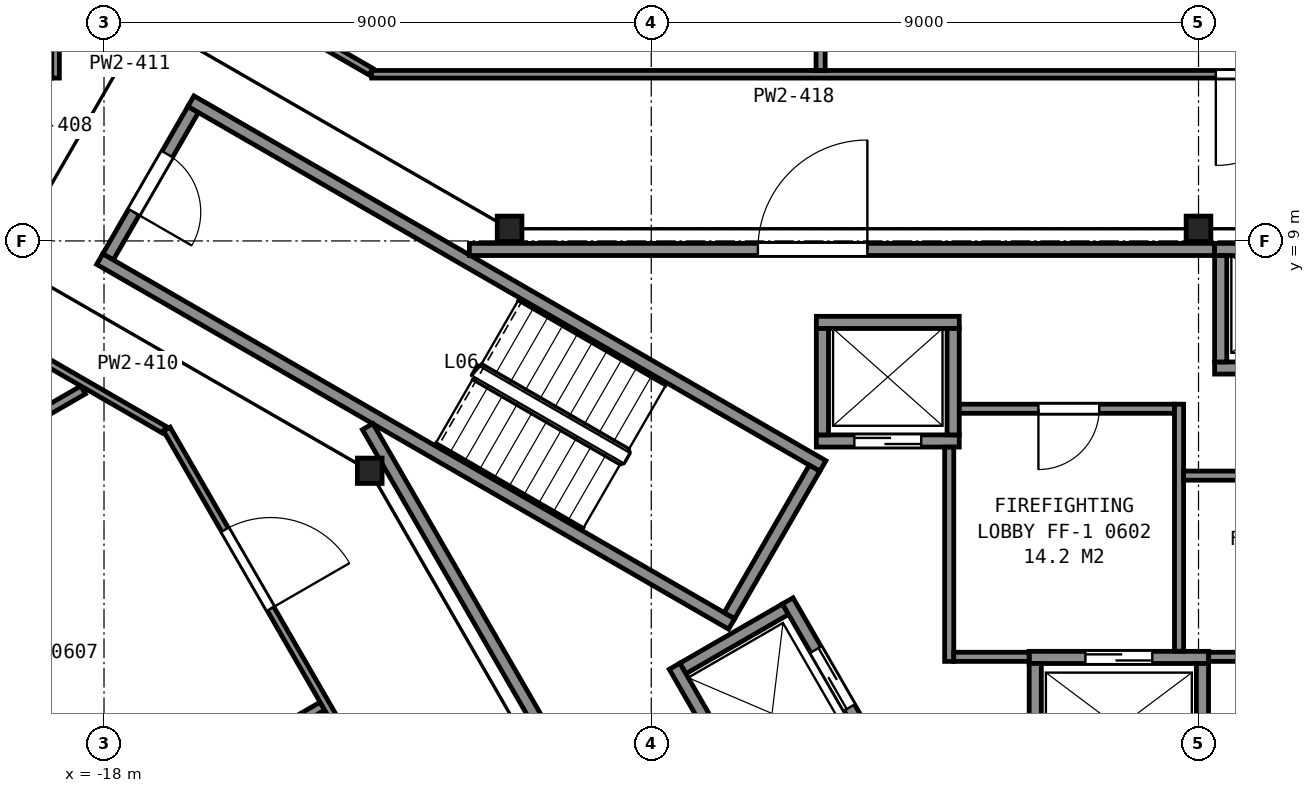
"""IFC4 building model, lengths in metres.
Left out: names, types, materials, properties, quantities, classifications, styles, units other than length and angle.
Written with IfcOpenShell. Run it as: python <this file> out.ifc"""

import sys

from ifc_helpers import new_model, si_unit, direction, frame, frame_2d, origin, origin_2d, place, context, subcontext, project, spatial, rectangle, i_section, extrude, element, fill, save


model = new_model("IFC4")
c1 = context("Model", 3, precision=1e-05, world=origin(), true_north=direction((0.0, 1.0)))
c2 = subcontext(c1, "Body", "Model", "MODEL_VIEW")
j1 = project(units=[si_unit("LENGTHUNIT", "METRE"), si_unit("PLANEANGLEUNIT", "RADIAN")], contexts=[c1])
p1 = place(None, origin())
s1 = spatial("IfcSite", under=j1, at=p1, CompositionType="ELEMENT")
p2 = place(p1, origin())
s2 = spatial("IfcBuilding", under=s1, at=p2, CompositionType="ELEMENT")
p3 = place(p2, frame((0.0, 0.0, 36.8)))
s3 = spatial("IfcBuildingStorey", under=s2, at=p3, CompositionType="ELEMENT", Elevation=36.8)
for number, where, z_axis, x_axis in (
    (1, (0.0, 9.2, 0.0), (0.0, 0.0, 1.0), (1.0, 0.0, 0.0)),
    (2, (-11.33, 9.2, 0.0), (0.0, 0.0, 1.0), (1.0, 0.0, 0.0)),
    (3, (-13.63, 5.22, 0.0), (0.0, 0.0, 1.0), (1.0, 0.0, 0.0)),
):
    element("IfcColumn", number, at=place(p3, frame(where, z_axis=z_axis, x_axis=x_axis)), inside=s3, PredefinedType="COLUMN", context=c2, shape_type="SweptSolid", body=[
        extrude(i_section(OverallWidth=0.406, OverallDepth=0.417, WebThickness=0.03, FlangeThickness=0.048, FilletRadius=0.015, at=origin_2d()), origin(), (0.0, 0.0, 1.0), 3.6),
    ])
p4 = place(p3, frame((-16.534, 11.162, 0.0), z_axis=(0.0, 0.0, 1.0), x_axis=(-0.49998411664, -0.866034573852, 0.0)))
e4 = element("IfcWall", 4, at=p4, inside=s3, PredefinedType="PARTITIONING", context=c2, shape_type="SweptSolid", body=[
    extrude(rectangle(XDim=2.8, YDim=0.2, at=frame_2d((1.4, 0.0))), origin(), (0.0, 0.0, 1.0), 3.35),
])
p5 = place(p4, frame((0.85, 0.0, 0.0)))
e5 = element("IfcOpeningElement", 5, at=p5, cuts=e4, PredefinedType="OPENING", context=c2, shape_type="SweptSolid", body=[
    extrude(rectangle(XDim=1.1, YDim=2.1, at=frame_2d((0.55, 1.05))), frame((0.0, 0.11, 0.0), z_axis=(0.0, -1.0, 0.0), x_axis=(1.0, 0.0, 0.0)), (0.0, 0.0, 1.0), 0.22),
])
for number, where, z_axis, x_axis in (
    (6, (-7.678, 2.701, 0.0), (0.0, 0.0, 1.0), (-0.866, 0.5, 0.0)),
    (7, (-6.178, 5.299, 0.0), (0.0, 0.0, 1.0), (-0.866, 0.5, 0.0)),
):
    element("IfcWall", number, at=place(p3, frame(where, z_axis=z_axis, x_axis=x_axis)), inside=s3, PredefinedType="PARTITIONING", context=c2, shape_type="SweptSolid", body=[
        extrude(rectangle(XDim=12.0, YDim=0.2, at=frame_2d((6.0, 0.0))), origin(), (0.0, 0.0, 1.0), 3.35),
    ])
p6 = place(p3, frame((-6.315, 5.262, 0.0), z_axis=(0.0, 0.0, 1.0), x_axis=(-0.500049511043, -0.865996816683, 0.0)))
e8 = element("IfcWall", 8, at=p6, inside=s3, PredefinedType="PARTITIONING", context=c2, shape_type="SweptSolid", body=[
    extrude(rectangle(XDim=2.8, YDim=0.2, at=frame_2d((1.4, 0.0))), origin(), (0.0, 0.0, 1.0), 3.35),
])
p7 = place(p3, frame((-2.785, 2.15, 0.0), z_axis=(0.0, 0.0, 1.0), x_axis=(1.0, 0.0, 0.0)))
e9 = element("IfcWall", 9, at=p7, inside=s3, PredefinedType="PARTITIONING", context=c2, shape_type="SweptSolid", body=[
    extrude(rectangle(XDim=2.95, YDim=0.2, at=frame_2d((1.475, 0.0))), origin(), (0.0, 0.0, 1.0), 3.6),
])
p8 = place(p7, frame((0.925, 0.0, 0.0)))
e10 = element("IfcOpeningElement", 10, at=p8, cuts=e9, PredefinedType="OPENING", context=c2, shape_type="SweptSolid", body=[
    extrude(rectangle(XDim=1.1, YDim=2.1, at=frame_2d((0.55, 1.05))), frame((0.0, 0.11, 0.0), z_axis=(0.0, -1.0, 0.0), x_axis=(1.0, 0.0, 0.0)), (0.0, 0.0, 1.0), 0.22),
])
p9 = place(p3, frame((-6.285, 5.71, 0.0), z_axis=(0.0, 0.0, 1.0), x_axis=(1.0, 0.0, 0.0)))
e11 = element("IfcWall", 11, at=p9, inside=s3, PredefinedType="PARTITIONING", context=c2, shape_type="SweptSolid", body=[
    extrude(rectangle(XDim=2.35, YDim=0.2, at=frame_2d((1.175, 0.0))), origin(), (0.0, 0.0, 1.0), 3.6),
])
p10 = place(p9, frame((0.625, 0.0, 0.0)))
e12 = element("IfcOpeningElement", 12, at=p10, cuts=e11, PredefinedType="OPENING", context=c2, shape_type="SweptSolid", body=[
    extrude(rectangle(XDim=1.1, YDim=2.1, at=frame_2d((0.55, 1.05))), frame((0.0, 0.11, 0.0), z_axis=(0.0, -1.0, 0.0), x_axis=(1.0, 0.0, 0.0)), (0.0, 0.0, 1.0), 0.22),
])
p11 = place(p3, frame((0.265, 6.91, 0.0), z_axis=(0.0, 0.0, 1.0), x_axis=(1.0, 0.0, 0.0)))
e13 = element("IfcWall", 13, at=p11, inside=s3, PredefinedType="PARTITIONING", context=c2, shape_type="SweptSolid", body=[
    extrude(rectangle(XDim=2.55, YDim=0.2, at=frame_2d((1.275, 0.0))), origin(), (0.0, 0.0, 1.0), 3.6),
])
p12 = place(p11, frame((0.725, 0.0, 0.0)))
e14 = element("IfcOpeningElement", 14, at=p12, cuts=e13, PredefinedType="OPENING", context=c2, shape_type="SweptSolid", body=[
    extrude(rectangle(XDim=1.1, YDim=2.1, at=frame_2d((0.55, 1.05))), frame((0.0, 0.11, 0.0), z_axis=(0.0, -1.0, 0.0), x_axis=(1.0, 0.0, 0.0)), (0.0, 0.0, 1.0), 0.22),
])
p13 = place(p3, frame((-6.285, 7.66, 0.0), z_axis=(0.0, 0.0, 1.0), x_axis=(1.0, 0.0, 0.0)))
e15 = element("IfcWall", 15, at=p13, inside=s3, PredefinedType="PARTITIONING", context=c2, shape_type="SweptSolid", body=[
    extrude(rectangle(XDim=2.35, YDim=0.2, at=frame_2d((1.175, 0.0))), origin(), (0.0, 0.0, 1.0), 3.6),
])
p14 = place(p3, frame((0.265, 8.86, 0.0), z_axis=(0.0, 0.0, 1.0), x_axis=(1.0, 0.0, 0.0)))
e16 = element("IfcWall", 16, at=p14, inside=s3, PredefinedType="PARTITIONING", context=c2, shape_type="SweptSolid", body=[
    extrude(rectangle(XDim=2.55, YDim=0.2, at=frame_2d((1.275, 0.0))), origin(), (0.0, 0.0, 1.0), 3.6),
])
p15 = place(p3, frame((-8.48, 1.969, 0.0), z_axis=(0.0, 0.0, 1.0), x_axis=(0.866000020948, 0.500043961785, 0.0)))
e17 = element("IfcWall", 17, at=p15, inside=s3, PredefinedType="PARTITIONING", context=c2, shape_type="SweptSolid", body=[
    extrude(rectangle(XDim=1.95, YDim=0.2, at=frame_2d((0.975, 0.0))), origin(), (0.0, 0.0, 1.0), 3.6),
])
p16 = place(p3, frame((0.365, 7.01, 0.0), z_axis=(0.0, 0.0, 1.0), x_axis=(0.0, 1.0, 0.0)))
e18 = element("IfcWall", 18, at=p16, inside=s3, PredefinedType="PARTITIONING", context=c2, shape_type="SweptSolid", body=[
    extrude(rectangle(XDim=1.75, YDim=0.2, at=frame_2d((0.875, 0.0))), origin(), (0.0, 0.0, 1.0), 3.6),
])
for number, where, z_axis, x_axis in (
    (19, (0.065, 0.1, 0.0), (0.0, 0.0, 1.0), (0.0, 1.0, 0.0)),
    (20, (-2.685, 0.1, 0.0), (0.0, 0.0, 1.0), (0.0, 1.0, 0.0)),
):
    element("IfcWall", number, at=place(p3, frame(where, z_axis=z_axis, x_axis=x_axis)), inside=s3, PredefinedType="PARTITIONING", context=c2, shape_type="SweptSolid", body=[
        extrude(rectangle(XDim=1.95, YDim=0.2, at=frame_2d((0.975, 0.0))), origin(), (0.0, 0.0, 1.0), 3.6),
    ])
for number, where, z_axis, x_axis in (
    (21, (-4.035, 5.81, 0.0), (0.0, 0.0, 1.0), (0.0, 1.0, 0.0)),
    (22, (-6.185, 5.81, 0.0), (0.0, 0.0, 1.0), (0.0, 1.0, 0.0)),
):
    element("IfcWall", number, at=place(p3, frame(where, z_axis=z_axis, x_axis=x_axis)), inside=s3, PredefinedType="PARTITIONING", context=c2, shape_type="SweptSolid", body=[
        extrude(rectangle(XDim=1.75, YDim=0.2, at=frame_2d((0.875, 0.0))), origin(), (0.0, 0.0, 1.0), 3.6),
    ])
p17 = place(p3, frame((-5.28, 0.525, 0.0), z_axis=(0.0, 0.0, 1.0), x_axis=(-0.500037662692, 0.866003658127, 0.0)))
e23 = element("IfcWall", 23, at=p17, inside=s3, PredefinedType="PARTITIONING", context=c2, shape_type="SweptSolid", body=[
    extrude(rectangle(XDim=2.95, YDim=0.2, at=frame_2d((1.475, 0.0))), origin(), (0.0, 0.0, 1.0), 3.6),
])
p18 = place(p17, frame((0.925, 0.0, 0.0)))
e24 = element("IfcOpeningElement", 24, at=p18, cuts=e23, PredefinedType="OPENING", context=c2, shape_type="SweptSolid", body=[
    extrude(rectangle(XDim=1.1, YDim=2.1, at=frame_2d((0.55, 1.05))), frame((0.0, 0.11, 0.0), z_axis=(0.0, -1.0, 0.0), x_axis=(1.0, 0.0, 0.0)), (0.0, 0.0, 1.0), 0.22),
])
p19 = place(p3, frame((-7.242, -0.376, 0.0), z_axis=(0.0, 0.0, 1.0), x_axis=(-0.499996545922, 0.866027397988, 0.0)))
e25 = element("IfcWall", 25, at=p19, inside=s3, PredefinedType="PARTITIONING", context=c2, shape_type="SweptSolid", body=[
    extrude(rectangle(XDim=2.75, YDim=0.2, at=frame_2d((1.375, 0.0))), origin(), (0.0, 0.0, 1.0), 3.6),
])
p20 = place(p3, frame((-13.664, 5.946, 0.0), z_axis=(0.0, 0.0, 1.0), x_axis=(0.499994327219, -0.866028678941, 0.0)))
e26 = element("IfcWall", 26, at=p20, inside=s3, PredefinedType="PARTITIONING", context=c2, shape_type="SweptSolid", body=[
    extrude(rectangle(XDim=23.968, YDim=0.2, at=frame_2d((11.984, 0.0))), origin(), (0.0, 0.0, 1.0), 3.35),
])
p21 = place(p3, frame((0.263, 8.86, 0.0), z_axis=(0.0, 0.0, 1.0), x_axis=(-1.0, 0.0, 0.0)))
e27 = element("IfcWall", 27, at=p21, inside=s3, PredefinedType="PARTITIONING", context=c2, shape_type="SweptSolid", body=[
    extrude(rectangle(XDim=12.254, YDim=0.2, at=frame_2d((6.127, 0.0))), origin(), (0.0, 0.0, 1.0), 3.35),
])
p22 = place(p21, frame((5.709, 0.0, 0.0)))
e28 = element("IfcOpeningElement", 28, at=p22, cuts=e27, PredefinedType="OPENING", context=c2, shape_type="SweptSolid", body=[
    extrude(rectangle(XDim=1.8, YDim=2.1, at=frame_2d((0.9, 1.05))), frame((0.0, 0.11, 0.0), z_axis=(0.0, -1.0, 0.0), x_axis=(1.0, 0.0, 0.0)), (0.0, 0.0, 1.0), 0.22),
])
p23 = place(p3, frame((-4.1, 2.085, 0.0), z_axis=(0.0, 0.0, 1.0), x_axis=(0.0, 1.0, 0.0)))
e29 = element("IfcWall", 29, at=p23, inside=s3, PredefinedType="PARTITIONING", context=c2, shape_type="SweptSolid", body=[
    extrude(rectangle(XDim=3.523, YDim=0.15, at=frame_2d((1.761, 0.0))), origin(), (0.0, 0.0, 1.0), 3.35),
])
p24 = place(p3, frame((-4.025, 2.16, 0.0), z_axis=(0.0, 0.0, 1.0), x_axis=(1.0, 0.0, 0.0)))
e30 = element("IfcWall", 30, at=p24, inside=s3, PredefinedType="PARTITIONING", context=c2, shape_type="SweptSolid", body=[
    extrude(rectangle(XDim=1.238, YDim=0.15, at=frame_2d((0.619, 0.0))), origin(), (0.0, 0.0, 1.0), 3.35),
])
p25 = place(p3, frame((-3.933, 6.24, 0.0), z_axis=(0.0, 0.0, 1.0), x_axis=(1.0, 0.0, 0.0)))
e31 = element("IfcWall", 31, at=p25, inside=s3, PredefinedType="PARTITIONING", context=c2, shape_type="SweptSolid", body=[
    extrude(rectangle(XDim=3.538, YDim=0.15, at=frame_2d((1.769, 0.0))), origin(), (0.0, 0.0, 1.0), 3.35),
])
p26 = place(p25, frame((1.3, 0.0, 0.0)))
e32 = element("IfcOpeningElement", 32, at=p26, cuts=e31, PredefinedType="OPENING", context=c2, shape_type="SweptSolid", body=[
    extrude(rectangle(XDim=1.0, YDim=2.1, at=frame_2d((0.5, 1.05))), frame((0.0, 0.085, 0.0), z_axis=(0.0, -1.0, 0.0), x_axis=(1.0, 0.0, 0.0)), (0.0, 0.0, 1.0), 0.17),
])
p27 = place(p3, frame((-0.32, 2.252, 0.0), z_axis=(0.0, 0.0, 1.0), x_axis=(0.0, 1.0, 0.0)))
e33 = element("IfcWall", 33, at=p27, inside=s3, PredefinedType="PARTITIONING", context=c2, shape_type="SweptSolid", body=[
    extrude(rectangle(XDim=4.063, YDim=0.15, at=frame_2d((2.031, 0.0))), origin(), (0.0, 0.0, 1.0), 3.35),
])
p28 = place(p3, frame((-0.245, 5.14, 0.0), z_axis=(0.0, 0.0, 1.0), x_axis=(1.0, 0.0, 0.0)))
e34 = element("IfcWall", 34, at=p28, inside=s3, PredefinedType="PARTITIONING", context=c2, shape_type="SweptSolid", body=[
    extrude(rectangle(XDim=5.11, YDim=0.15, at=frame_2d((2.555, 0.0))), origin(), (0.0, 0.0, 1.0), 3.35),
])
p29 = place(p28, frame((1.975, 0.0, 0.0)))
e35 = element("IfcOpeningElement", 35, at=p29, cuts=e34, PredefinedType="OPENING", context=c2, shape_type="SweptSolid", body=[
    extrude(rectangle(XDim=1.0, YDim=2.1, at=frame_2d((0.5, 1.05))), frame((0.0, 0.085, 0.0), z_axis=(0.0, -1.0, 0.0), x_axis=(1.0, 0.0, 0.0)), (0.0, 0.0, 1.0), 0.17),
])
p30 = place(p3, frame((0.167, 2.16, 0.0), z_axis=(0.0, 0.0, 1.0), x_axis=(1.0, 0.0, 0.0)))
e36 = element("IfcWall", 36, at=p30, inside=s3, PredefinedType="PARTITIONING", context=c2, shape_type="SweptSolid", body=[
    extrude(rectangle(XDim=1.356, YDim=0.15, at=frame_2d((0.678, 0.0))), origin(), (0.0, 0.0, 1.0), 3.35),
])
p31 = place(p3, frame((-25.084, 2.657, 0.0), z_axis=(0.0, 0.0, 1.0), x_axis=(0.866001204974, 0.500041911227, 0.0)))
e37 = element("IfcWall", 37, at=p31, inside=s3, PredefinedType="PARTITIONING", context=c2, shape_type="SweptSolid", body=[
    extrude(rectangle(XDim=7.784, YDim=0.15, at=frame_2d((3.892, 0.0))), origin(), (0.0, 0.0, 1.0), 2.613),
])
p32 = place(p3, frame((-21.848, -2.948, 0.0), z_axis=(0.0, 0.0, 1.0), x_axis=(0.865958884393, 0.500115197271, 0.0)))
e38 = element("IfcWall", 38, at=p32, inside=s3, PredefinedType="PARTITIONING", context=c2, shape_type="SweptSolid", body=[
    extrude(rectangle(XDim=8.591, YDim=0.15, at=frame_2d((4.296, 0.0))), origin(), (0.0, 0.0, 1.0), 2.613),
])
p33 = place(p3, frame((-19.26, 7.194, 0.0), z_axis=(0.0, 0.0, 1.0), x_axis=(0.865944638795, -0.50013986298, 0.0)))
e39 = element("IfcWall", 39, at=p33, inside=s3, PredefinedType="PARTITIONING", context=c2, shape_type="SweptSolid", body=[
    extrude(rectangle(XDim=2.599, YDim=0.125, at=frame_2d((1.299, 0.0))), origin(), (0.0, 0.0, 1.0), 2.613),
])
p34 = place(p3, frame((-18.797, 11.678, 0.0), z_axis=(0.0, 0.0, 1.0), x_axis=(0.0, 1.0, 0.0)))
e40 = element("IfcWall", 40, at=p34, inside=s3, PredefinedType="PARTITIONING", context=c2, shape_type="SweptSolid", body=[
    extrude(rectangle(XDim=2.394, YDim=0.125, at=frame_2d((1.197, 0.0))), origin(), (0.0, 0.0, 1.0), 2.613),
])
p35 = place(p3, frame((-3.766, -16.958, 0.0), z_axis=(0.0, 0.0, 1.0), x_axis=(-0.500024758804, 0.866011108811, 0.0)))
e41 = element("IfcWall", 41, at=p35, inside=s3, PredefinedType="PARTITIONING", context=c2, shape_type="SweptSolid", body=[
    extrude(rectangle(XDim=26.402, YDim=0.125, at=frame_2d((13.201, 0.0))), origin(), (0.0, 0.0, 1.0), 2.613),
])
p36 = place(p35, frame((22.989, 0.0, 0.0)))
e42 = element("IfcOpeningElement", 42, at=p36, cuts=e41, PredefinedType="OPENING", context=c2, shape_type="SweptSolid", body=[
    extrude(rectangle(XDim=1.5, YDim=2.1, at=frame_2d((0.75, 1.05))), frame((0.0, 0.073, 0.0), z_axis=(0.0, -1.0, 0.0), x_axis=(1.0, 0.0, 0.0)), (0.0, 0.0, 1.0), 0.145),
])
p37 = place(p35, frame((17.175, 0.0, 0.0)))
e43 = element("IfcOpeningElement", 43, at=p37, cuts=e41, PredefinedType="OPENING", context=c2, shape_type="SweptSolid", body=[
    extrude(rectangle(XDim=1.5, YDim=2.1, at=frame_2d((0.75, 1.05))), frame((0.0, 0.073, 0.0), z_axis=(0.0, -1.0, 0.0), x_axis=(1.0, 0.0, 0.0)), (0.0, 0.0, 1.0), 0.145),
])
p38 = place(p35, frame((10.703, 0.0, 0.0)))
e44 = element("IfcOpeningElement", 44, at=p38, cuts=e41, PredefinedType="OPENING", context=c2, shape_type="SweptSolid", body=[
    extrude(rectangle(XDim=1.5, YDim=2.1, at=frame_2d((0.75, 1.05))), frame((0.0, 0.073, 0.0), z_axis=(0.0, -1.0, 0.0), x_axis=(1.0, 0.0, 0.0)), (0.0, 0.0, 1.0), 0.145),
])
p39 = place(p35, frame((4.231, 0.0, 0.0)))
e45 = element("IfcOpeningElement", 45, at=p39, cuts=e41, PredefinedType="OPENING", context=c2, shape_type="SweptSolid", body=[
    extrude(rectangle(XDim=1.5, YDim=2.1, at=frame_2d((0.75, 1.05))), frame((0.0, 0.073, 0.0), z_axis=(0.0, -1.0, 0.0), x_axis=(1.0, 0.0, 0.0)), (0.0, 0.0, 1.0), 0.145),
])
p40 = place(p3, frame((-15.857, 13.081, 0.0), z_axis=(0.0, 0.0, 1.0), x_axis=(0.865988195383, -0.500064441305, 0.0)))
e46 = element("IfcWall", 46, at=p40, inside=s3, PredefinedType="PARTITIONING", context=c2, shape_type="SweptSolid", body=[
    extrude(rectangle(XDim=2.595, YDim=0.125, at=frame_2d((1.298, 0.0))), origin(), (0.0, 0.0, 1.0), 2.613),
])
p41 = place(p3, frame((-13.598, 11.741, 0.0), z_axis=(0.0, 0.0, 1.0), x_axis=(1.0, 0.0, 0.0)))
e47 = element("IfcWall", 47, at=p41, inside=s3, PredefinedType="PARTITIONING", context=c2, shape_type="SweptSolid", body=[
    extrude(rectangle(XDim=27.197, YDim=0.125, at=frame_2d((13.598, 0.0))), origin(), (0.0, 0.0, 1.0), 2.613),
])
p42 = place(p41, frame((13.884, 0.0, 0.0)))
e48 = element("IfcOpeningElement", 48, at=p42, cuts=e47, PredefinedType="OPENING", context=c2, shape_type="SweptSolid", body=[
    extrude(rectangle(XDim=1.5, YDim=2.1, at=frame_2d((0.75, 1.05))), frame((0.0, 0.073, 0.0), z_axis=(0.0, -1.0, 0.0), x_axis=(1.0, 0.0, 0.0)), (0.0, 0.0, 1.0), 0.145),
])
p43 = place(p3, frame((-6.215, 11.803, 0.0), z_axis=(0.0, 0.0, 1.0), x_axis=(0.0, 1.0, 0.0)))
e49 = element("IfcWall", 49, at=p43, inside=s3, PredefinedType="PARTITIONING", context=c2, shape_type="SweptSolid", body=[
    extrude(rectangle(XDim=8.592, YDim=0.15, at=frame_2d((4.296, 0.0))), origin(), (0.0, 0.0, 1.0), 2.613),
])
p44 = place(p5, origin())
e50 = element("IfcDoor", 50, at=p44, inside=s3, OperationType="SINGLE_SWING_RIGHT", PredefinedType="DOOR", context=c2, shape_type="SweptSolid", body=[
    extrude(rectangle(XDim=1.1, YDim=2.1, at=frame_2d((0.55, 1.05))), frame((0.0, 0.025, 0.0), z_axis=(0.0, -1.0, 0.0), x_axis=(1.0, 0.0, 0.0)), (0.0, 0.0, 1.0), 0.05),
])
fill(e5, e50)
p45 = place(p10, origin())
e51 = element("IfcDoor", 51, at=p45, inside=s3, OperationType="SLIDING_TO_RIGHT", PredefinedType="DOOR", context=c2, shape_type="SweptSolid", body=[
    extrude(rectangle(XDim=1.1, YDim=2.1, at=frame_2d((0.55, 1.05))), frame((0.0, 0.025, 0.0), z_axis=(0.0, -1.0, 0.0), x_axis=(1.0, 0.0, 0.0)), (0.0, 0.0, 1.0), 0.05),
])
fill(e12, e51)
p46 = place(p8, origin())
e52 = element("IfcDoor", 52, at=p46, inside=s3, OperationType="SLIDING_TO_LEFT", PredefinedType="DOOR", context=c2, shape_type="SweptSolid", body=[
    extrude(rectangle(XDim=1.1, YDim=2.1, at=frame_2d((0.55, 1.05))), frame((0.0, 0.025, 0.0), z_axis=(0.0, -1.0, 0.0), x_axis=(1.0, 0.0, 0.0)), (0.0, 0.0, 1.0), 0.05),
])
fill(e10, e52)
p47 = place(p18, origin())
e53 = element("IfcDoor", 53, at=p47, inside=s3, OperationType="SLIDING_TO_LEFT", PredefinedType="DOOR", context=c2, shape_type="SweptSolid", body=[
    extrude(rectangle(XDim=1.1, YDim=2.1, at=frame_2d((0.55, 1.05))), frame((0.0, 0.025, 0.0), z_axis=(0.0, -1.0, 0.0), x_axis=(1.0, 0.0, 0.0)), (0.0, 0.0, 1.0), 0.05),
])
fill(e24, e53)
p48 = place(p22, origin())
e54 = element("IfcDoor", 54, at=p48, inside=s3, OperationType="DOUBLE_DOOR_SINGLE_SWING", PredefinedType="DOOR", context=c2, shape_type="SweptSolid", body=[
    extrude(rectangle(XDim=1.8, YDim=2.1, at=frame_2d((0.9, 1.05))), frame((0.0, 0.025, 0.0), z_axis=(0.0, -1.0, 0.0), x_axis=(1.0, 0.0, 0.0)), (0.0, 0.0, 1.0), 0.05),
])
fill(e28, e54)
p49 = place(p26, origin())
e55 = element("IfcDoor", 55, at=p49, inside=s3, OperationType="SINGLE_SWING_LEFT", PredefinedType="DOOR", context=c2, shape_type="SweptSolid", body=[
    extrude(rectangle(XDim=1.0, YDim=2.1, at=frame_2d((0.5, 1.05))), frame((0.0, 0.025, 0.0), z_axis=(0.0, -1.0, 0.0), x_axis=(1.0, 0.0, 0.0)), (0.0, 0.0, 1.0), 0.05),
])
fill(e32, e55)
p50 = place(p36, origin())
e56 = element("IfcDoor", 56, at=p50, inside=s3, OperationType="DOUBLE_DOOR_SINGLE_SWING", PredefinedType="DOOR", context=c2, shape_type="SweptSolid", body=[
    extrude(rectangle(XDim=1.5, YDim=2.1, at=frame_2d((0.75, 1.05))), frame((0.0, 0.025, 0.0), z_axis=(0.0, -1.0, 0.0), x_axis=(1.0, 0.0, 0.0)), (0.0, 0.0, 1.0), 0.05),
])
fill(e42, e56)
p51 = place(p42, origin())
e57 = element("IfcDoor", 57, at=p51, inside=s3, OperationType="DOUBLE_DOOR_SINGLE_SWING", PredefinedType="DOOR", context=c2, shape_type="SweptSolid", body=[
    extrude(rectangle(XDim=1.5, YDim=2.1, at=frame_2d((0.75, 1.05))), frame((0.0, 0.025, 0.0), z_axis=(0.0, -1.0, 0.0), x_axis=(1.0, 0.0, 0.0)), (0.0, 0.0, 1.0), 0.05),
])
fill(e48, e57)
save(model, sys.argv[1])
